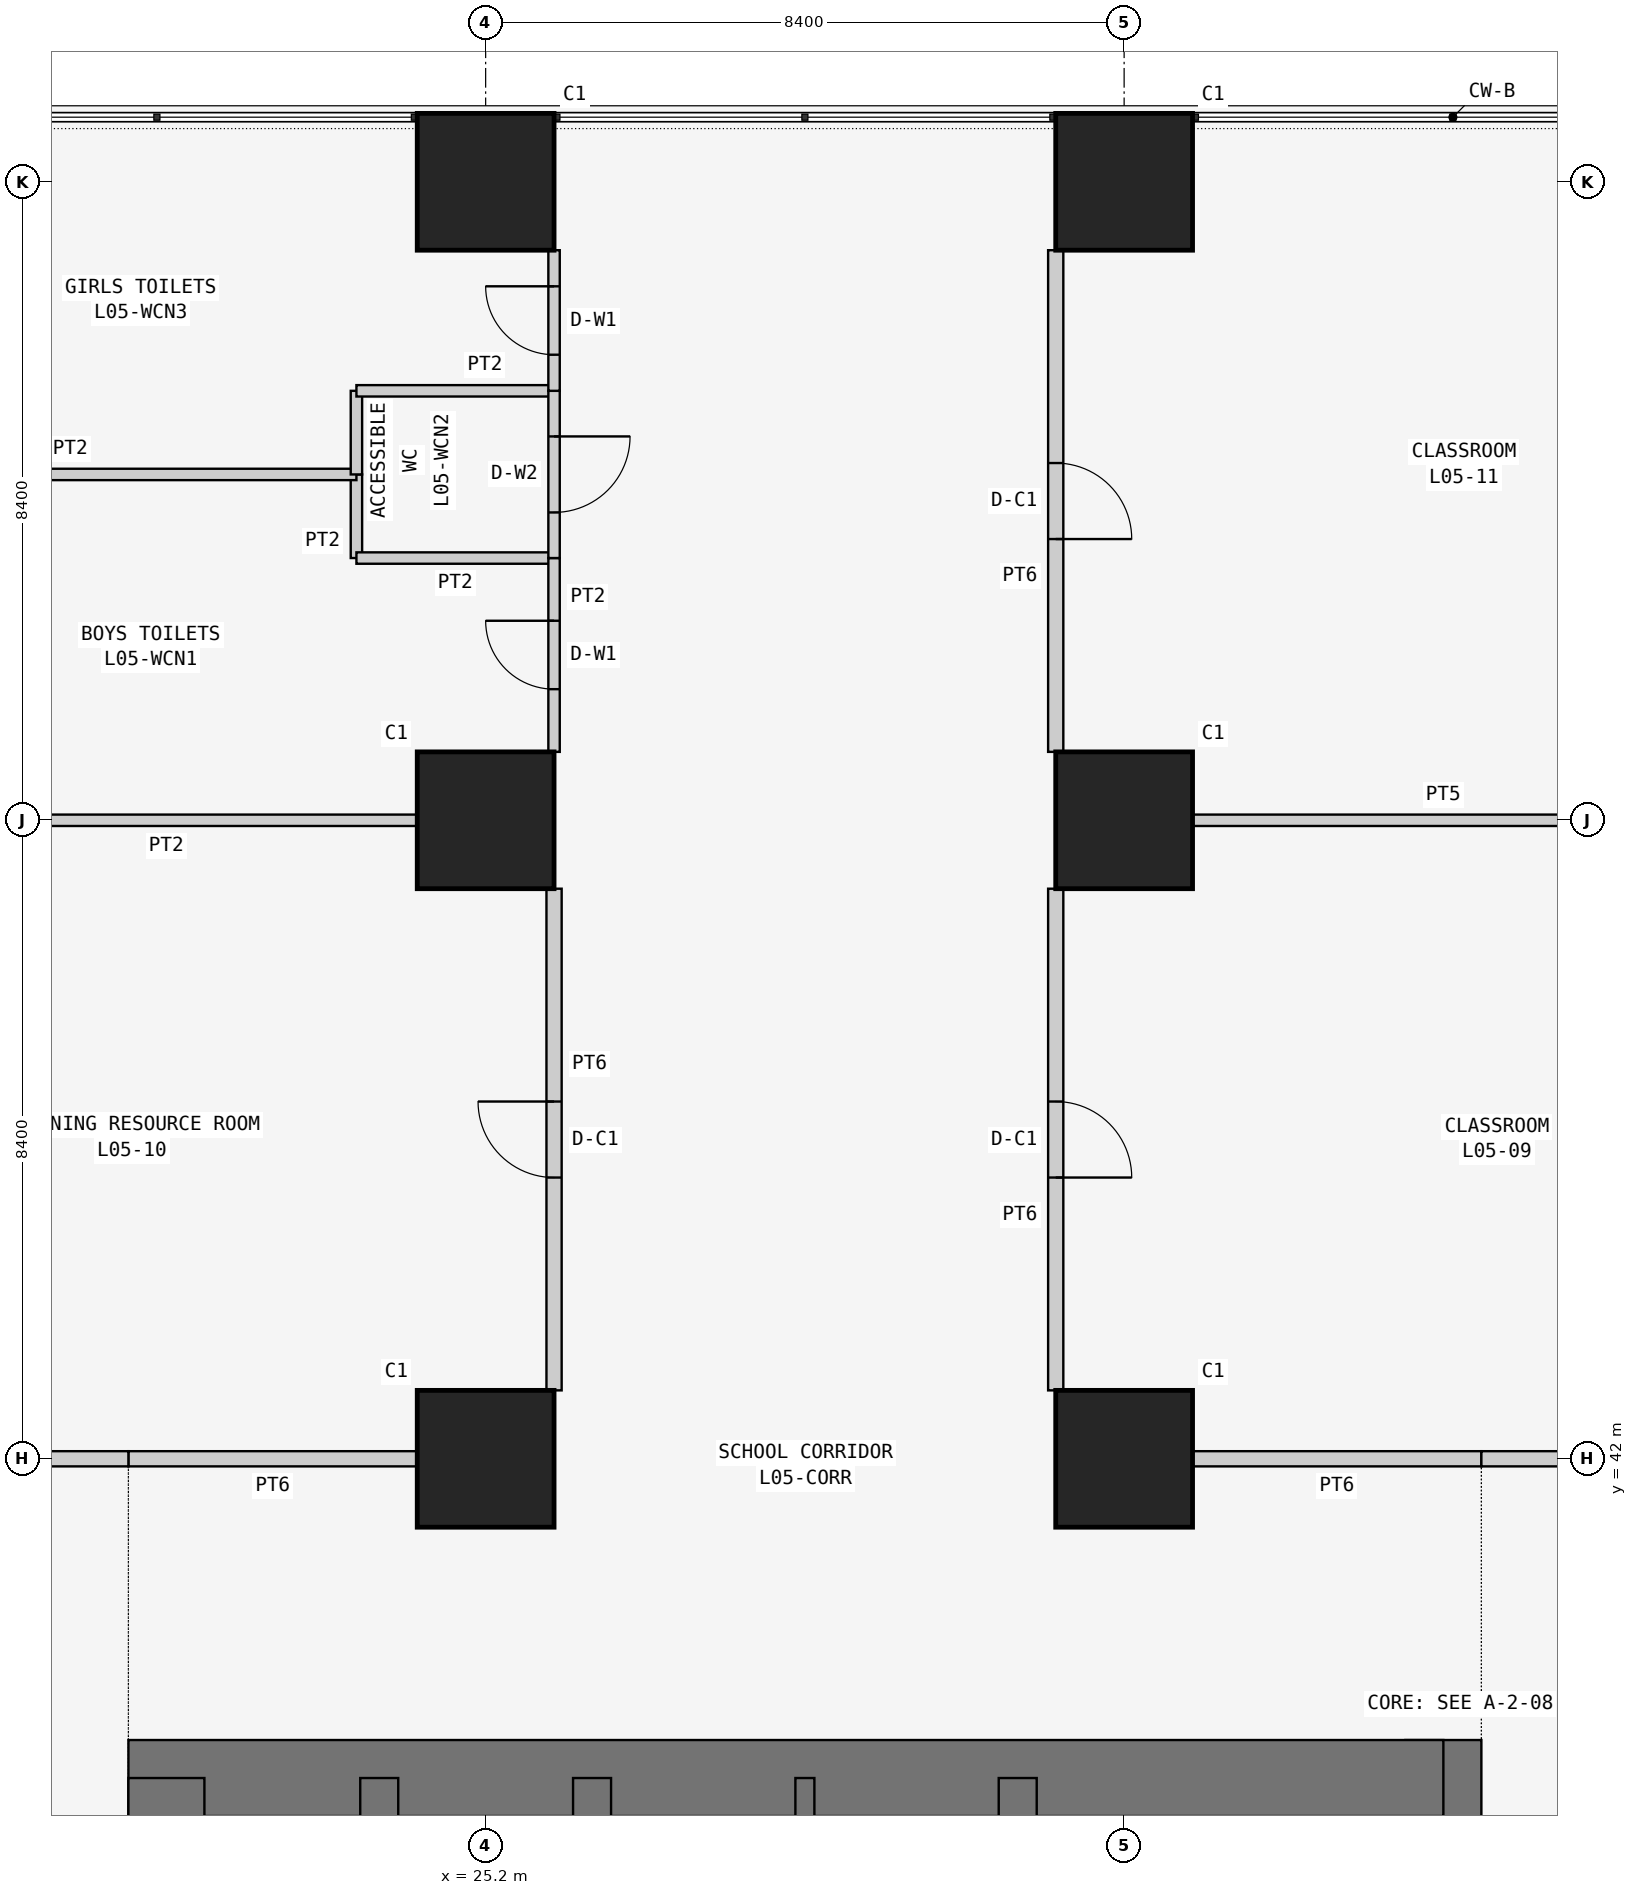
"""IFC4 building model, lengths in metres.
Left out: names, types, materials, properties, quantities, classifications, styles, units other than length and angle.
Written with IfcOpenShell. Run it as: python <this file> out.ifc"""

import sys

from ifc_helpers import new_model, si_unit, direction, frame, frame_2d, origin, origin_2d, place, context, subcontext, project, spatial, rectangle, extrude, element, fill, save


model = new_model("IFC4")
c1 = context("Model", 3, precision=1e-05, world=origin(), true_north=direction((0.0, 1.0)))
c2 = subcontext(c1, "Body", "Model", "MODEL_VIEW")
j1 = project(units=[si_unit("LENGTHUNIT", "METRE"), si_unit("PLANEANGLEUNIT", "RADIAN")], contexts=[c1])
p1 = place(None, origin())
s1 = spatial("IfcSite", under=j1, at=p1, CompositionType="ELEMENT")
p2 = place(p1, origin())
s2 = spatial("IfcBuilding", under=s1, at=p2, CompositionType="ELEMENT")
p3 = place(p2, frame((0.0, 0.0, 24.0)))
s3 = spatial("IfcBuildingStorey", under=s2, at=p3, CompositionType="ELEMENT", Elevation=24.0)
for number, where, z_axis, x_axis in (
    (1, (25.2, 42.0, 0.0), (0.0, 0.0, 1.0), (1.0, 0.0, 0.0)),
    (2, (25.2, 50.4, 0.0), (0.0, 0.0, 1.0), (1.0, 0.0, 0.0)),
    (3, (25.2, 58.8, 0.0), (0.0, 0.0, 1.0), (1.0, 0.0, 0.0)),
    (4, (33.6, 42.0, 0.0), (0.0, 0.0, 1.0), (1.0, 0.0, 0.0)),
    (5, (33.6, 50.4, 0.0), (0.0, 0.0, 1.0), (1.0, 0.0, 0.0)),
    (6, (33.6, 58.8, 0.0), (0.0, 0.0, 1.0), (1.0, 0.0, 0.0)),
):
    element("IfcColumn", number, at=place(p3, frame(where, z_axis=z_axis, x_axis=x_axis)), inside=s3, PredefinedType="COLUMN", context=c2, shape_type="SweptSolid", body=[
        extrude(rectangle(XDim=1.8, YDim=1.8, at=origin_2d()), origin(), (0.0, 0.0, 1.0), 4.5),
    ])
p4 = place(p3, frame((37.8, 21.0, 0.0), z_axis=(0.0, 0.0, 1.0), x_axis=(0.0, 1.0, 0.0)))
e7 = element("IfcWall", 7, at=p4, inside=s3, PredefinedType="SHEAR", context=c2, shape_type="SweptSolid", body=[
    extrude(rectangle(XDim=17.3, YDim=1.0, at=frame_2d((8.65, 0.0))), origin(), (0.0, 0.0, 1.0), 4.5),
])
p5 = place(p4, frame((5.2, 0.0, 0.0)))
e8 = element("IfcOpeningElement", 8, at=p5, cuts=e7, PredefinedType="OPENING", context=c2, shape_type="SweptSolid", body=[
    extrude(rectangle(XDim=1.2, YDim=2.1, at=frame_2d((0.6, 1.05))), frame((0.0, 0.51, 0.0), z_axis=(0.0, -1.0, 0.0), x_axis=(1.0, 0.0, 0.0)), (0.0, 0.0, 1.0), 1.02),
])
p6 = place(p3, frame((37.8, 37.8, 0.0), z_axis=(0.0, 0.0, 1.0), x_axis=(-1.0, 0.0, 0.0)))
e9 = element("IfcWall", 9, at=p6, inside=s3, PredefinedType="SHEAR", context=c2, shape_type="SweptSolid", body=[
    extrude(rectangle(XDim=17.3, YDim=1.0, at=frame_2d((8.65, 0.0))), origin(), (0.0, 0.0, 1.0), 4.5),
])
p7 = place(p3, frame((21.0, 37.8, 0.0), z_axis=(0.0, 0.0, 1.0), x_axis=(0.0, -1.0, 0.0)))
e10 = element("IfcWall", 10, at=p7, inside=s3, PredefinedType="SHEAR", context=c2, shape_type="SweptSolid", body=[
    extrude(rectangle(XDim=17.3, YDim=1.0, at=frame_2d((8.65, 0.0))), origin(), (0.0, 0.0, 1.0), 4.5),
])
p8 = place(p7, frame((5.4, 0.0, 0.0)))
e11 = element("IfcOpeningElement", 11, at=p8, cuts=e10, PredefinedType="OPENING", context=c2, shape_type="SweptSolid", body=[
    extrude(rectangle(XDim=1.2, YDim=2.1, at=frame_2d((0.6, 1.05))), frame((0.0, 0.51, 0.0), z_axis=(0.0, -1.0, 0.0), x_axis=(1.0, 0.0, 0.0)), (0.0, 0.0, 1.0), 1.02),
])
p9 = place(p3, frame((26.6, 21.0, 0.0), z_axis=(0.0, 0.0, 1.0), x_axis=(0.0, 1.0, 0.0)))
e12 = element("IfcWall", 12, at=p9, inside=s3, PredefinedType="SHEAR", context=c2, shape_type="SweptSolid", body=[
    extrude(rectangle(XDim=16.8, YDim=0.5, at=frame_2d((8.4, 0.0))), origin(), (0.0, 0.0, 1.0), 4.5),
])
p10 = place(p9, frame((10.4, 0.0, 0.0)))
e13 = element("IfcOpeningElement", 13, at=p10, cuts=e12, PredefinedType="OPENING", context=c2, shape_type="SweptSolid", body=[
    extrude(rectangle(XDim=1.2, YDim=2.1, at=frame_2d((0.6, 1.05))), frame((0.0, 0.26, 0.0), z_axis=(0.0, -1.0, 0.0), x_axis=(1.0, 0.0, 0.0)), (0.0, 0.0, 1.0), 0.52),
])
p11 = place(p3, frame((23.8, 34.6, 0.0), z_axis=(0.0, 0.0, 1.0), x_axis=(0.0, 1.0, 0.0)))
e14 = element("IfcWall", 14, at=p11, inside=s3, PredefinedType="SHEAR", context=c2, shape_type="SweptSolid", body=[
    extrude(rectangle(XDim=3.2, YDim=0.5, at=frame_2d((1.6, 0.0))), origin(), (0.0, 0.0, 1.0), 4.5),
])
p12 = place(p3, frame((32.2, 29.15, 0.0), z_axis=(0.0, 0.0, 1.0), x_axis=(0.0, 1.0, 0.0)))
e15 = element("IfcWall", 15, at=p12, inside=s3, PredefinedType="SHEAR", context=c2, shape_type="SweptSolid", body=[
    extrude(rectangle(XDim=8.65, YDim=0.5, at=frame_2d((4.325, 0.0))), origin(), (0.0, 0.0, 1.0), 4.5),
])
p13 = place(p3, frame((29.4, 34.6, 0.0), z_axis=(0.0, 0.0, 1.0), x_axis=(0.0, 1.0, 0.0)))
e16 = element("IfcWall", 16, at=p13, inside=s3, PredefinedType="SHEAR", context=c2, shape_type="SweptSolid", body=[
    extrude(rectangle(XDim=3.2, YDim=0.25, at=frame_2d((1.6, 0.0))), origin(), (0.0, 0.0, 1.0), 4.5),
])
p14 = place(p3, frame((23.5, 54.95, 0.0), z_axis=(0.0, 0.0, 1.0), x_axis=(0.0, -1.0, 0.0)))
e17 = element("IfcWall", 17, at=p14, inside=s3, PredefinedType="PARTITIONING", context=c2, shape_type="SweptSolid", body=[
    extrude(rectangle(XDim=1.1, YDim=0.15, at=frame_2d((0.55, 0.0))), origin(), (0.0, 0.0, 1.0), 4.25),
])
p15 = place(p3, frame((23.5, 53.85, 0.0), z_axis=(0.0, 0.0, 1.0), x_axis=(1.0, 0.0, 0.0)))
e18 = element("IfcWall", 18, at=p15, inside=s3, PredefinedType="PARTITIONING", context=c2, shape_type="SweptSolid", body=[
    extrude(rectangle(XDim=2.6, YDim=0.15, at=frame_2d((1.3, 0.0))), origin(), (0.0, 0.0, 1.0), 4.25),
])
p16 = place(p3, frame((15.974, 54.95, 0.0), z_axis=(0.0, 0.0, 1.0), x_axis=(1.0, 0.0, 0.0)))
e19 = element("IfcWall", 19, at=p16, inside=s3, PredefinedType="PARTITIONING", context=c2, shape_type="SweptSolid", body=[
    extrude(rectangle(XDim=7.526, YDim=0.15, at=frame_2d((3.763, 0.0))), origin(), (0.0, 0.0, 1.0), 4.25),
])
p17 = place(p3, frame((24.3, 50.4, 0.0), z_axis=(0.0, 0.0, 1.0), x_axis=(-1.0, 0.0, 0.0)))
e20 = element("IfcWall", 20, at=p17, inside=s3, PredefinedType="PARTITIONING", context=c2, shape_type="SweptSolid", body=[
    extrude(rectangle(XDim=6.6, YDim=0.15, at=frame_2d((3.3, 0.0))), origin(), (0.0, 0.0, 1.0), 3.409),
])
p18 = place(p3, frame((26.1, 53.85, 0.0), z_axis=(0.0, 0.0, 1.0), x_axis=(0.0, -1.0, 0.0)))
e21 = element("IfcWall", 21, at=p18, inside=s3, PredefinedType="PARTITIONING", context=c2, shape_type="SweptSolid", body=[
    extrude(rectangle(XDim=2.55, YDim=0.15, at=frame_2d((1.275, 0.0))), origin(), (0.0, 0.0, 1.0), 4.25),
])
p19 = place(p18, frame((0.825, 0.0, 0.0)))
e22 = element("IfcOpeningElement", 22, at=p19, cuts=e21, PredefinedType="OPENING", context=c2, shape_type="SweptSolid", body=[
    extrude(rectangle(XDim=0.9, YDim=2.1, at=frame_2d((0.45, 1.05))), frame((0.0, 0.085, 0.0), z_axis=(0.0, -1.0, 0.0), x_axis=(1.0, 0.0, 0.0)), (0.0, 0.0, 1.0), 0.17),
])
p20 = place(p3, frame((23.5, 54.95, 0.0), z_axis=(0.0, 0.0, 1.0), x_axis=(0.0, 1.0, 0.0)))
e23 = element("IfcWall", 23, at=p20, inside=s3, PredefinedType="PARTITIONING", context=c2, shape_type="SweptSolid", body=[
    extrude(rectangle(XDim=1.1, YDim=0.15, at=frame_2d((0.55, 0.0))), origin(), (0.0, 0.0, 1.0), 4.25),
])
p21 = place(p3, frame((23.5, 56.05, 0.0), z_axis=(0.0, 0.0, 1.0), x_axis=(1.0, 0.0, 0.0)))
e24 = element("IfcWall", 24, at=p21, inside=s3, PredefinedType="PARTITIONING", context=c2, shape_type="SweptSolid", body=[
    extrude(rectangle(XDim=2.6, YDim=0.15, at=frame_2d((1.3, 0.0))), origin(), (0.0, 0.0, 1.0), 4.25),
])
p22 = place(p3, frame((26.1, 56.05, 0.0), z_axis=(0.0, 0.0, 1.0), x_axis=(0.0, -1.0, 0.0)))
e25 = element("IfcWall", 25, at=p22, inside=s3, PredefinedType="PARTITIONING", context=c2, shape_type="SweptSolid", body=[
    extrude(rectangle(XDim=2.2, YDim=0.15, at=frame_2d((1.1, 0.0))), origin(), (0.0, 0.0, 1.0), 4.25),
])
p23 = place(p22, frame((0.6, 0.0, 0.0)))
e26 = element("IfcOpeningElement", 26, at=p23, cuts=e25, PredefinedType="OPENING", context=c2, shape_type="SweptSolid", body=[
    extrude(rectangle(XDim=1.0, YDim=2.1, at=frame_2d((0.5, 1.05))), frame((0.0, 0.085, 0.0), z_axis=(0.0, -1.0, 0.0), x_axis=(1.0, 0.0, 0.0)), (0.0, 0.0, 1.0), 0.17),
])
p24 = place(p3, frame((26.1, 57.9, 0.0), z_axis=(0.0, 0.0, 1.0), x_axis=(0.0, -1.0, 0.0)))
e27 = element("IfcWall", 27, at=p24, inside=s3, PredefinedType="PARTITIONING", context=c2, shape_type="SweptSolid", body=[
    extrude(rectangle(XDim=1.85, YDim=0.15, at=frame_2d((0.925, 0.0))), origin(), (0.0, 0.0, 1.0), 4.25),
])
p25 = place(p24, frame((0.475, 0.0, 0.0)))
e28 = element("IfcOpeningElement", 28, at=p25, cuts=e27, PredefinedType="OPENING", context=c2, shape_type="SweptSolid", body=[
    extrude(rectangle(XDim=0.9, YDim=2.1, at=frame_2d((0.45, 1.05))), frame((0.0, 0.085, 0.0), z_axis=(0.0, -1.0, 0.0), x_axis=(1.0, 0.0, 0.0)), (0.0, 0.0, 1.0), 0.17),
])
p26 = place(p3, frame((34.5, 50.4, 0.0), z_axis=(0.0, 0.0, 1.0), x_axis=(1.0, 0.0, 0.0)))
e29 = element("IfcWall", 29, at=p26, inside=s3, PredefinedType="PARTITIONING", context=c2, shape_type="SweptSolid", body=[
    extrude(rectangle(XDim=6.6, YDim=0.15, at=frame_2d((3.3, 0.0))), origin(), (0.0, 0.0, 1.0), 3.409),
])
p27 = place(p3, frame((32.7, 42.9, 0.0), z_axis=(0.0, 0.0, 1.0), x_axis=(0.0, 1.0, 0.0)))
e30 = element("IfcWall", 30, at=p27, inside=s3, PredefinedType="PARTITIONING", context=c2, shape_type="SweptSolid", body=[
    extrude(rectangle(XDim=6.6, YDim=0.2, at=frame_2d((3.3, 0.0))), origin(), (0.0, 0.0, 1.0), 4.25),
])
p28 = place(p27, frame((2.8, 0.0, 0.0)))
e31 = element("IfcOpeningElement", 31, at=p28, cuts=e30, PredefinedType="OPENING", context=c2, shape_type="SweptSolid", body=[
    extrude(rectangle(XDim=1.0, YDim=2.1, at=frame_2d((0.5, 1.05))), frame((0.0, 0.11, 0.0), z_axis=(0.0, -1.0, 0.0), x_axis=(1.0, 0.0, 0.0)), (0.0, 0.0, 1.0), 0.22),
])
p29 = place(p3, frame((38.3, 42.0, 0.0), z_axis=(0.0, 0.0, 1.0), x_axis=(-1.0, 0.0, 0.0)))
e32 = element("IfcWall", 32, at=p29, inside=s3, PredefinedType="PARTITIONING", context=c2, shape_type="SweptSolid", body=[
    extrude(rectangle(XDim=3.8, YDim=0.2, at=frame_2d((1.9, 0.0))), origin(), (0.0, 0.0, 1.0), 3.409),
])
p30 = place(p3, frame((41.1, 42.0, 0.0), z_axis=(0.0, 0.0, 1.0), x_axis=(-1.0, 0.0, 0.0)))
e33 = element("IfcWall", 33, at=p30, inside=s3, PredefinedType="PARTITIONING", context=c2, shape_type="SweptSolid", body=[
    extrude(rectangle(XDim=2.8, YDim=0.2, at=frame_2d((1.4, 0.0))), origin(), (0.0, 0.0, 1.0), 3.409),
])
p31 = place(p3, frame((24.3, 42.0, 0.0), z_axis=(0.0, 0.0, 1.0), x_axis=(-1.0, 0.0, 0.0)))
e34 = element("IfcWall", 34, at=p31, inside=s3, PredefinedType="PARTITIONING", context=c2, shape_type="SweptSolid", body=[
    extrude(rectangle(XDim=3.8, YDim=0.2, at=frame_2d((1.9, 0.0))), origin(), (0.0, 0.0, 1.0), 3.409),
])
p32 = place(p3, frame((26.1, 49.5, 0.0), z_axis=(0.0, 0.0, 1.0), x_axis=(0.0, -1.0, 0.0)))
e35 = element("IfcWall", 35, at=p32, inside=s3, PredefinedType="PARTITIONING", context=c2, shape_type="SweptSolid", body=[
    extrude(rectangle(XDim=6.6, YDim=0.2, at=frame_2d((3.3, 0.0))), origin(), (0.0, 0.0, 1.0), 4.25),
])
p33 = place(p32, frame((2.8, 0.0, 0.0)))
e36 = element("IfcOpeningElement", 36, at=p33, cuts=e35, PredefinedType="OPENING", context=c2, shape_type="SweptSolid", body=[
    extrude(rectangle(XDim=1.0, YDim=2.1, at=frame_2d((0.5, 1.05))), frame((0.0, 0.11, 0.0), z_axis=(0.0, -1.0, 0.0), x_axis=(1.0, 0.0, 0.0)), (0.0, 0.0, 1.0), 0.22),
])
p34 = place(p3, frame((20.5, 42.0, 0.0), z_axis=(0.0, 0.0, 1.0), x_axis=(-1.0, 0.0, 0.0)))
e37 = element("IfcWall", 37, at=p34, inside=s3, PredefinedType="PARTITIONING", context=c2, shape_type="SweptSolid", body=[
    extrude(rectangle(XDim=2.8, YDim=0.2, at=frame_2d((1.4, 0.0))), origin(), (0.0, 0.0, 1.0), 3.409),
])
p35 = place(p3, frame((32.7, 51.3, 0.0), z_axis=(0.0, 0.0, 1.0), x_axis=(0.0, 1.0, 0.0)))
e38 = element("IfcWall", 38, at=p35, inside=s3, PredefinedType="PARTITIONING", context=c2, shape_type="SweptSolid", body=[
    extrude(rectangle(XDim=6.6, YDim=0.2, at=frame_2d((3.3, 0.0))), origin(), (0.0, 0.0, 1.0), 4.25),
])
p36 = place(p35, frame((2.8, 0.0, 0.0)))
e39 = element("IfcOpeningElement", 39, at=p36, cuts=e38, PredefinedType="OPENING", context=c2, shape_type="SweptSolid", body=[
    extrude(rectangle(XDim=1.0, YDim=2.1, at=frame_2d((0.5, 1.05))), frame((0.0, 0.11, 0.0), z_axis=(0.0, -1.0, 0.0), x_axis=(1.0, 0.0, 0.0)), (0.0, 0.0, 1.0), 0.22),
])
p37 = place(p19, frame((0.9, 0.0, 0.0), z_axis=(0.0, 0.0, 1.0), x_axis=(-1.0, 0.0, 0.0)))
e40 = element("IfcDoor", 40, at=p37, inside=s3, OperationType="SINGLE_SWING_RIGHT", PredefinedType="DOOR", context=c2, shape_type="SweptSolid", body=[
    extrude(rectangle(XDim=0.9, YDim=2.1, at=frame_2d((0.45, 1.05))), frame((0.0, 0.025, 0.0), z_axis=(0.0, -1.0, 0.0), x_axis=(1.0, 0.0, 0.0)), (0.0, 0.0, 1.0), 0.05),
])
fill(e22, e40)
p38 = place(p23, origin())
e41 = element("IfcDoor", 41, at=p38, inside=s3, OperationType="SINGLE_SWING_LEFT", PredefinedType="DOOR", context=c2, shape_type="SweptSolid", body=[
    extrude(rectangle(XDim=1.0, YDim=2.1, at=frame_2d((0.5, 1.05))), frame((0.0, 0.025, 0.0), z_axis=(0.0, -1.0, 0.0), x_axis=(1.0, 0.0, 0.0)), (0.0, 0.0, 1.0), 0.05),
])
fill(e26, e41)
p39 = place(p25, frame((0.9, 0.0, 0.0), z_axis=(0.0, 0.0, 1.0), x_axis=(-1.0, 0.0, 0.0)))
e42 = element("IfcDoor", 42, at=p39, inside=s3, OperationType="SINGLE_SWING_RIGHT", PredefinedType="DOOR", context=c2, shape_type="SweptSolid", body=[
    extrude(rectangle(XDim=0.9, YDim=2.1, at=frame_2d((0.45, 1.05))), frame((0.0, 0.025, 0.0), z_axis=(0.0, -1.0, 0.0), x_axis=(1.0, 0.0, 0.0)), (0.0, 0.0, 1.0), 0.05),
])
fill(e28, e42)
p40 = place(p28, frame((1.0, 0.0, 0.0), z_axis=(0.0, 0.0, 1.0), x_axis=(-1.0, 0.0, 0.0)))
e43 = element("IfcDoor", 43, at=p40, inside=s3, OperationType="SINGLE_SWING_RIGHT", PredefinedType="DOOR", context=c2, shape_type="SweptSolid", body=[
    extrude(rectangle(XDim=1.0, YDim=2.1, at=frame_2d((0.5, 1.05))), frame((0.0, 0.025, 0.0), z_axis=(0.0, -1.0, 0.0), x_axis=(1.0, 0.0, 0.0)), (0.0, 0.0, 1.0), 0.05),
])
fill(e31, e43)
p41 = place(p33, frame((1.0, 0.0, 0.0), z_axis=(0.0, 0.0, 1.0), x_axis=(-1.0, 0.0, 0.0)))
e44 = element("IfcDoor", 44, at=p41, inside=s3, OperationType="SINGLE_SWING_RIGHT", PredefinedType="DOOR", context=c2, shape_type="SweptSolid", body=[
    extrude(rectangle(XDim=1.0, YDim=2.1, at=frame_2d((0.5, 1.05))), frame((0.0, 0.025, 0.0), z_axis=(0.0, -1.0, 0.0), x_axis=(1.0, 0.0, 0.0)), (0.0, 0.0, 1.0), 0.05),
])
fill(e36, e44)
p42 = place(p36, frame((1.0, 0.0, 0.0), z_axis=(0.0, 0.0, 1.0), x_axis=(-1.0, 0.0, 0.0)))
e45 = element("IfcDoor", 45, at=p42, inside=s3, OperationType="SINGLE_SWING_RIGHT", PredefinedType="DOOR", context=c2, shape_type="SweptSolid", body=[
    extrude(rectangle(XDim=1.0, YDim=2.1, at=frame_2d((0.5, 1.05))), frame((0.0, 0.025, 0.0), z_axis=(0.0, -1.0, 0.0), x_axis=(1.0, 0.0, 0.0)), (0.0, 0.0, 1.0), 0.05),
])
fill(e39, e45)
save(model, sys.argv[1])
